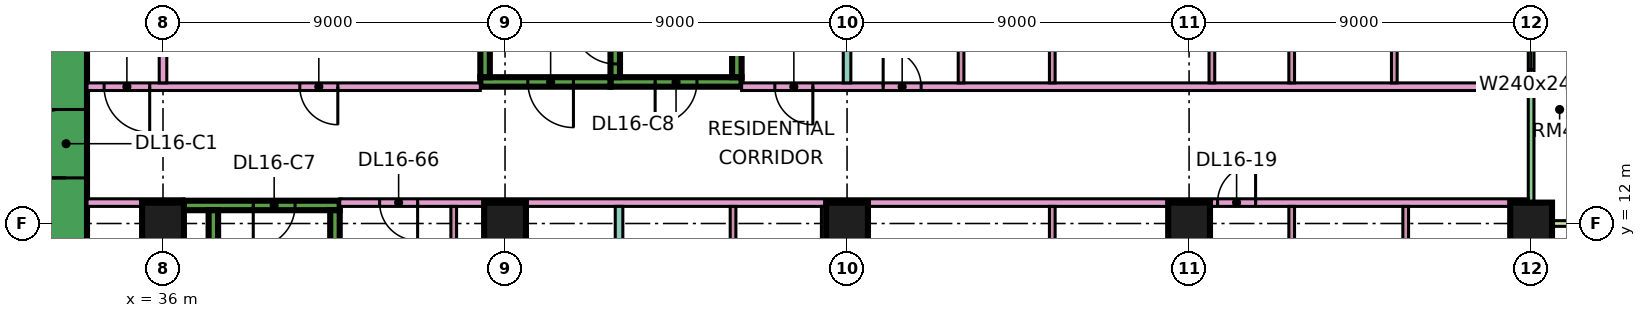
"""IFC4 building model, lengths in metres.
Left out: names, types, materials, properties, quantities, classifications, styles, units other than length and angle.
Written with IfcOpenShell. Run it as: python <this file> out.ifc"""

import sys

from ifc_helpers import new_model, si_unit, direction, frame, frame_2d, origin, origin_2d, place, context, subcontext, project, spatial, rectangle, extrude, element, fill, save


model = new_model("IFC4")
c1 = context("Model", 3, precision=1e-05, world=origin(), true_north=direction((0.0, 1.0)))
c2 = subcontext(c1, "Body", "Model", "MODEL_VIEW")
j1 = project(units=[si_unit("LENGTHUNIT", "METRE"), si_unit("PLANEANGLEUNIT", "RADIAN")], contexts=[c1])
p1 = place(None, origin())
s1 = spatial("IfcSite", under=j1, at=p1, CompositionType="ELEMENT")
p2 = place(p1, origin())
s2 = spatial("IfcBuilding", under=s1, at=p2, CompositionType="ELEMENT")
p3 = place(p2, frame((0.0, 0.0, 75.15)))
s3 = spatial("IfcBuildingStorey", under=s2, at=p3, CompositionType="ELEMENT", Elevation=75.15)
for number, where, z_axis, x_axis in (
    (1, (36.0, 12.0, 0.0), (0.0, 0.0, 1.0), (1.0, 0.0, 0.0)),
    (2, (45.0, 12.0, 0.0), (0.0, 0.0, 1.0), (1.0, 0.0, 0.0)),
    (3, (54.0, 12.0, 0.0), (0.0, 0.0, 1.0), (1.0, 0.0, 0.0)),
    (4, (63.0, 12.0, 0.0), (0.0, 0.0, 1.0), (1.0, 0.0, 0.0)),
    (5, (72.0, 12.0, 0.0), (0.0, 0.0, 1.0), (1.0, 0.0, 0.0)),
):
    element("IfcColumn", number, at=place(p3, frame(where, z_axis=z_axis, x_axis=x_axis)), inside=s3, PredefinedType="COLUMN", context=c2, shape_type="SweptSolid", body=[
        extrude(rectangle(XDim=1.1, YDim=1.1, at=origin_2d()), origin(), (0.0, 0.0, 1.0), 3.75),
    ])
p4 = place(p3, frame((33.45, 8.1, 0.0), z_axis=(0.0, 0.0, 1.0), x_axis=(0.0, 1.0, 0.0)))
e6 = element("IfcWall", 6, at=p4, inside=s3, PredefinedType="SHEAR", context=c2, shape_type="SweptSolid", body=[
    extrude(rectangle(XDim=10.8, YDim=1.1, at=frame_2d((5.4, 0.0))), origin(), (0.0, 0.0, 1.0), 3.75),
])
p5 = place(p4, frame((5.1, 0.0, 0.0)))
e7 = element("IfcOpeningElement", 7, at=p5, cuts=e6, PredefinedType="OPENING", context=c2, shape_type="SweptSolid", body=[
    extrude(rectangle(XDim=1.8, YDim=2.4, at=frame_2d((0.9, 1.2))), frame((0.0, 0.56, 0.0), z_axis=(0.0, -1.0, 0.0), x_axis=(1.0, 0.0, 0.0)), (0.0, 0.0, 1.0), 1.12),
])
p6 = place(p3, frame((36.55, 12.475, 0.0), z_axis=(0.0, 0.0, 1.0), x_axis=(1.0, 0.0, 0.0)))
e8 = element("IfcWall", 8, at=p6, inside=s3, PredefinedType="SHEAR", context=c2, shape_type="SweptSolid", body=[
    extrude(rectangle(XDim=4.1, YDim=0.25, at=frame_2d((2.05, 0.0))), origin(), (0.0, 0.0, 1.0), 3.75),
])
p7 = place(p6, frame((1.825, 0.0, 0.0)))
e9 = element("IfcOpeningElement", 9, at=p7, cuts=e8, PredefinedType="OPENING", context=c2, shape_type="SweptSolid", body=[
    extrude(rectangle(XDim=1.1, YDim=2.2, at=frame_2d((0.55, 1.1))), frame((0.0, 0.135, 0.0), z_axis=(0.0, -1.0, 0.0), x_axis=(1.0, 0.0, 0.0)), (0.0, 0.0, 1.0), 0.27),
])
for number, where, z_axis, x_axis in (
    (10, (37.325, 5.85, 0.0), (0.0, 0.0, 1.0), (0.0, 1.0, 0.0)),
    (11, (40.525, 5.85, 0.0), (0.0, 0.0, 1.0), (0.0, 1.0, 0.0)),
):
    element("IfcWall", number, at=place(p3, frame(where, z_axis=z_axis, x_axis=x_axis)), inside=s3, PredefinedType="SHEAR", context=c2, shape_type="SweptSolid", body=[
        extrude(rectangle(XDim=6.5, YDim=0.25, at=frame_2d((3.25, 0.0))), origin(), (0.0, 0.0, 1.0), 3.75),
    ])
p8 = place(p3, frame((47.775, 15.725, 0.0), z_axis=(0.0, 0.0, 1.0), x_axis=(1.0, 0.0, 0.0)))
e12 = element("IfcWall", 12, at=p8, inside=s3, PredefinedType="SHEAR", context=c2, shape_type="SweptSolid", body=[
    extrude(rectangle(XDim=3.45, YDim=0.25, at=frame_2d((1.725, 0.0))), origin(), (0.0, 0.0, 1.0), 3.75),
])
p9 = place(p8, frame((1.175, 0.0, 0.0)))
e13 = element("IfcOpeningElement", 13, at=p9, cuts=e12, PredefinedType="OPENING", context=c2, shape_type="SweptSolid", body=[
    extrude(rectangle(XDim=1.1, YDim=2.2, at=frame_2d((0.55, 1.1))), frame((0.0, 0.135, 0.0), z_axis=(0.0, -1.0, 0.0), x_axis=(1.0, 0.0, 0.0)), (0.0, 0.0, 1.0), 0.27),
])
p10 = place(p3, frame((47.9, 15.85, 0.0), z_axis=(0.0, 0.0, 1.0), x_axis=(0.0, 1.0, 0.0)))
e14 = element("IfcWall", 14, at=p10, inside=s3, PredefinedType="SHEAR", context=c2, shape_type="SweptSolid", body=[
    extrude(rectangle(XDim=6.5, YDim=0.25, at=frame_2d((3.25, 0.0))), origin(), (0.0, 0.0, 1.0), 3.75),
])
p11 = place(p10, frame((0.35, 0.0, 0.0)))
e15 = element("IfcOpeningElement", 15, at=p11, cuts=e14, PredefinedType="OPENING", context=c2, shape_type="SweptSolid", body=[
    extrude(rectangle(XDim=1.1, YDim=2.2, at=frame_2d((0.55, 1.1))), frame((0.0, 0.135, 0.0), z_axis=(0.0, -1.0, 0.0), x_axis=(1.0, 0.0, 0.0)), (0.0, 0.0, 1.0), 0.27),
])
p12 = place(p3, frame((51.1, 15.85, 0.0), z_axis=(0.0, 0.0, 1.0), x_axis=(0.0, 1.0, 0.0)))
e16 = element("IfcWall", 16, at=p12, inside=s3, PredefinedType="SHEAR", context=c2, shape_type="SweptSolid", body=[
    extrude(rectangle(XDim=6.5, YDim=0.25, at=frame_2d((3.25, 0.0))), origin(), (0.0, 0.0, 1.0), 3.75),
])
p13 = place(p3, frame((44.35, 15.725, 0.0), z_axis=(0.0, 0.0, 1.0), x_axis=(1.0, 0.0, 0.0)))
e17 = element("IfcWall", 17, at=p13, inside=s3, PredefinedType="SHEAR", context=c2, shape_type="SweptSolid", body=[
    extrude(rectangle(XDim=3.425, YDim=0.25, at=frame_2d((1.712, 0.0))), origin(), (0.0, 0.0, 1.0), 3.75),
])
p14 = place(p13, frame((1.25, 0.0, 0.0)))
e18 = element("IfcOpeningElement", 18, at=p14, cuts=e17, PredefinedType="OPENING", context=c2, shape_type="SweptSolid", body=[
    extrude(rectangle(XDim=1.2, YDim=2.2, at=frame_2d((0.6, 1.1))), frame((0.0, 0.135, 0.0), z_axis=(0.0, -1.0, 0.0), x_axis=(1.0, 0.0, 0.0)), (0.0, 0.0, 1.0), 0.27),
])
p15 = place(p3, frame((44.475, 15.85, 0.0), z_axis=(0.0, 0.0, 1.0), x_axis=(0.0, 1.0, 0.0)))
e19 = element("IfcWall", 19, at=p15, inside=s3, PredefinedType="SHEAR", context=c2, shape_type="SweptSolid", body=[
    extrude(rectangle(XDim=6.5, YDim=0.25, at=frame_2d((3.25, 0.0))), origin(), (0.0, 0.0, 1.0), 3.75),
])
p16 = place(p15, frame((1.75, 0.0, 0.0)))
e20 = element("IfcOpeningElement", 20, at=p16, cuts=e19, PredefinedType="OPENING", context=c2, shape_type="SweptSolid", body=[
    extrude(rectangle(XDim=1.1, YDim=2.2, at=frame_2d((0.55, 1.1))), frame((0.0, 0.135, 0.0), z_axis=(0.0, -1.0, 0.0), x_axis=(1.0, 0.0, 0.0)), (0.0, 0.0, 1.0), 0.27),
])
p17 = place(p15, frame((4.3, 0.0, 0.0)))
e21 = element("IfcOpeningElement", 21, at=p17, cuts=e19, PredefinedType="OPENING", context=c2, shape_type="SweptSolid", body=[
    extrude(rectangle(XDim=1.1, YDim=2.2, at=frame_2d((0.55, 1.1))), frame((0.0, 0.135, 0.0), z_axis=(0.0, -1.0, 0.0), x_axis=(1.0, 0.0, 0.0)), (0.0, 0.0, 1.0), 0.27),
])
p18 = place(p3, frame((72.0, 12.075, 0.0), z_axis=(0.0, 0.0, 1.0), x_axis=(0.0, 1.0, 0.0)))
e22 = element("IfcWall", 22, at=p18, inside=s3, PredefinedType="SOLIDWALL", context=c2, shape_type="SweptSolid", body=[
    extrude(rectangle(XDim=10.35, YDim=0.15, at=frame_2d((5.175, 0.0))), origin(), (0.0, 0.0, 1.0), 3.35),
])
p19 = place(p18, frame((3.975, 0.0, 0.45)))
e23 = element("IfcOpeningElement", 23, at=p19, cuts=e22, PredefinedType="OPENING", context=c2, shape_type="SweptSolid", body=[
    extrude(rectangle(XDim=2.4, YDim=2.4, at=frame_2d((1.2, 1.2))), frame((0.0, 0.085, 0.0), z_axis=(0.0, -1.0, 0.0), x_axis=(1.0, 0.0, 0.0)), (0.0, 0.0, 1.0), 0.17),
])
p20 = place(p18, frame((8.587, 0.0, 0.45)))
e24 = element("IfcOpeningElement", 24, at=p20, cuts=e22, PredefinedType="OPENING", context=c2, shape_type="SweptSolid", body=[
    extrude(rectangle(XDim=1.2, YDim=2.4, at=frame_2d((0.6, 1.2))), frame((0.0, 0.085, 0.0), z_axis=(0.0, -1.0, 0.0), x_axis=(1.0, 0.0, 0.0)), (0.0, 0.0, 1.0), 0.17),
])
p21 = place(p3, frame((73.5, 12.0, 0.0), z_axis=(0.0, 0.0, 1.0), x_axis=(-1.0, 0.0, 0.0)))
e25 = element("IfcWall", 25, at=p21, inside=s3, PredefinedType="SOLIDWALL", context=c2, shape_type="SweptSolid", body=[
    extrude(rectangle(XDim=1.5, YDim=0.15, at=frame_2d((0.75, 0.0))), origin(), (0.0, 0.0, 1.0), 3.35),
])
p22 = place(p3, frame((34.0, 12.55, 0.0), z_axis=(0.0, 0.0, 1.0), x_axis=(1.0, 0.0, 0.0)))
e26 = element("IfcWall", 26, at=p22, inside=s3, PredefinedType="PARTITIONING", context=c2, shape_type="SweptSolid", body=[
    extrude(rectangle(XDim=2.551, YDim=0.2, at=frame_2d((1.275, 0.0))), origin(), (0.0, 0.0, 1.0), 3.35),
])
p23 = place(p3, frame((34.0, 15.6, 0.0), z_axis=(0.0, 0.0, 1.0), x_axis=(1.0, 0.0, 0.0)))
e27 = element("IfcWall", 27, at=p23, inside=s3, PredefinedType="PARTITIONING", context=c2, shape_type="SweptSolid", body=[
    extrude(rectangle(XDim=10.35, YDim=0.2, at=frame_2d((5.175, 0.0))), origin(), (0.0, 0.0, 1.0), 3.35),
])
p24 = place(p23, frame((5.6, 0.0, 0.0)))
e28 = element("IfcOpeningElement", 28, at=p24, cuts=e27, PredefinedType="OPENING", context=c2, shape_type="SweptSolid", body=[
    extrude(rectangle(XDim=1.0, YDim=2.1, at=frame_2d((0.5, 1.05))), frame((0.0, 0.11, 0.0), z_axis=(0.0, -1.0, 0.0), x_axis=(1.0, 0.0, 0.0)), (0.0, 0.0, 1.0), 0.22),
])
p25 = place(p23, frame((0.45, 0.0, 0.0)))
e29 = element("IfcOpeningElement", 29, at=p25, cuts=e27, PredefinedType="OPENING", context=c2, shape_type="SweptSolid", body=[
    extrude(rectangle(XDim=1.2, YDim=2.1, at=frame_2d((0.6, 1.05))), frame((0.0, 0.11, 0.0), z_axis=(0.0, -1.0, 0.0), x_axis=(1.0, 0.0, 0.0)), (0.0, 0.0, 1.0), 0.22),
])
p26 = place(p3, frame((36.0, 15.7, 0.0), z_axis=(0.0, 0.0, 1.0), x_axis=(0.0, 1.0, 0.0)))
e30 = element("IfcWall", 30, at=p26, inside=s3, PredefinedType="PARTITIONING", context=c2, shape_type="SweptSolid", body=[
    extrude(rectangle(XDim=8.3, YDim=0.2, at=frame_2d((4.15, 0.0))), origin(), (0.0, 0.0, 1.0), 3.35),
])
p27 = place(p3, frame((40.65, 12.55, 0.0), z_axis=(0.0, 0.0, 1.0), x_axis=(1.0, 0.0, 0.0)))
e31 = element("IfcWall", 31, at=p27, inside=s3, PredefinedType="PARTITIONING", context=c2, shape_type="SweptSolid", body=[
    extrude(rectangle(XDim=31.276, YDim=0.2, at=frame_2d((15.638, 0.0))), origin(), (0.0, 0.0, 1.0), 3.35),
])
p28 = place(p27, frame((23.1, 0.0, 0.0)))
e32 = element("IfcOpeningElement", 32, at=p28, cuts=e31, PredefinedType="OPENING", context=c2, shape_type="SweptSolid", body=[
    extrude(rectangle(XDim=1.0, YDim=2.1, at=frame_2d((0.5, 1.05))), frame((0.0, 0.11, 0.0), z_axis=(0.0, -1.0, 0.0), x_axis=(1.0, 0.0, 0.0)), (0.0, 0.0, 1.0), 0.22),
])
p29 = place(p27, frame((1.05, 0.0, 0.0)))
e33 = element("IfcOpeningElement", 33, at=p29, cuts=e31, PredefinedType="OPENING", context=c2, shape_type="SweptSolid", body=[
    extrude(rectangle(XDim=1.0, YDim=2.1, at=frame_2d((0.5, 1.05))), frame((0.0, 0.11, 0.0), z_axis=(0.0, -1.0, 0.0), x_axis=(1.0, 0.0, 0.0)), (0.0, 0.0, 1.0), 0.22),
])
p30 = place(p3, frame((43.65, 5.825, 0.0), z_axis=(0.0, 0.0, 1.0), x_axis=(0.0, 1.0, 0.0)))
e34 = element("IfcWall", 34, at=p30, inside=s3, PredefinedType="PARTITIONING", context=c2, shape_type="SweptSolid", body=[
    extrude(rectangle(XDim=6.625, YDim=0.15, at=frame_2d((3.312, 0.0))), origin(), (0.0, 0.0, 1.0), 3.35),
])
p31 = place(p30, frame((4.425, 0.0, 0.0)))
e35 = element("IfcOpeningElement", 35, at=p31, cuts=e34, PredefinedType="OPENING", context=c2, shape_type="SweptSolid", body=[
    extrude(rectangle(XDim=0.9, YDim=2.1, at=frame_2d((0.45, 1.05))), frame((0.0, 0.085, 0.0), z_axis=(0.0, -1.0, 0.0), x_axis=(1.0, 0.0, 0.0)), (0.0, 0.0, 1.0), 0.17),
])
p32 = place(p3, frame((48.0, 5.875, 0.0), z_axis=(0.0, 0.0, 1.0), x_axis=(0.0, 1.0, 0.0)))
e36 = element("IfcWall", 36, at=p32, inside=s3, PredefinedType="PARTITIONING", context=c2, shape_type="SweptSolid", body=[
    extrude(rectangle(XDim=6.575, YDim=0.2, at=frame_2d((3.288, 0.0))), origin(), (0.0, 0.0, 1.0), 3.35),
])
p33 = place(p3, frame((51.0, 7.225, 0.0), z_axis=(0.0, 0.0, 1.0), x_axis=(0.0, 1.0, 0.0)))
e37 = element("IfcWall", 37, at=p33, inside=s3, PredefinedType="PARTITIONING", context=c2, shape_type="SweptSolid", body=[
    extrude(rectangle(XDim=5.225, YDim=0.15, at=frame_2d((2.612, 0.0))), origin(), (0.0, 0.0, 1.0), 3.35),
])
p34 = place(p3, frame((51.225, 15.6, 0.0), z_axis=(0.0, 0.0, 1.0), x_axis=(1.0, 0.0, 0.0)))
e38 = element("IfcWall", 38, at=p34, inside=s3, PredefinedType="PARTITIONING", context=c2, shape_type="SweptSolid", body=[
    extrude(rectangle(XDim=20.701, YDim=0.2, at=frame_2d((10.351, 0.0))), origin(), (0.0, 0.0, 1.0), 3.35),
])
p35 = place(p34, frame((3.725, 0.0, 0.0)))
e39 = element("IfcOpeningElement", 39, at=p35, cuts=e38, PredefinedType="OPENING", context=c2, shape_type="SweptSolid", body=[
    extrude(rectangle(XDim=1.0, YDim=2.1, at=frame_2d((0.5, 1.05))), frame((0.0, 0.11, 0.0), z_axis=(0.0, -1.0, 0.0), x_axis=(1.0, 0.0, 0.0)), (0.0, 0.0, 1.0), 0.22),
])
p36 = place(p34, frame((0.875, 0.0, 0.0)))
e40 = element("IfcOpeningElement", 40, at=p36, cuts=e38, PredefinedType="OPENING", context=c2, shape_type="SweptSolid", body=[
    extrude(rectangle(XDim=1.0, YDim=2.1, at=frame_2d((0.5, 1.05))), frame((0.0, 0.11, 0.0), z_axis=(0.0, -1.0, 0.0), x_axis=(1.0, 0.0, 0.0)), (0.0, 0.0, 1.0), 0.22),
])
p37 = place(p3, frame((53.4, 7.225, 0.0), z_axis=(0.0, 0.0, 1.0), x_axis=(0.0, 1.0, 0.0)))
e41 = element("IfcWall", 41, at=p37, inside=s3, PredefinedType="PARTITIONING", context=c2, shape_type="SweptSolid", body=[
    extrude(rectangle(XDim=5.225, YDim=0.15, at=frame_2d((2.612, 0.0))), origin(), (0.0, 0.0, 1.0), 3.35),
])
p38 = place(p3, frame((54.0, 15.7, 0.0), z_axis=(0.0, 0.0, 1.0), x_axis=(0.0, 1.0, 0.0)))
e42 = element("IfcWall", 42, at=p38, inside=s3, PredefinedType="PARTITIONING", context=c2, shape_type="SweptSolid", body=[
    extrude(rectangle(XDim=8.3, YDim=0.2, at=frame_2d((4.15, 0.0))), origin(), (0.0, 0.0, 1.0), 3.35),
])
p39 = place(p3, frame((57.0, 15.7, 0.0), z_axis=(0.0, 0.0, 1.0), x_axis=(0.0, 1.0, 0.0)))
e43 = element("IfcWall", 43, at=p39, inside=s3, PredefinedType="PARTITIONING", context=c2, shape_type="SweptSolid", body=[
    extrude(rectangle(XDim=3.125, YDim=0.15, at=frame_2d((1.562, 0.0))), origin(), (0.0, 0.0, 1.0), 3.35),
])
p40 = place(p3, frame((59.4, 7.225, 0.0), z_axis=(0.0, 0.0, 1.0), x_axis=(0.0, 1.0, 0.0)))
e44 = element("IfcWall", 44, at=p40, inside=s3, PredefinedType="PARTITIONING", context=c2, shape_type="SweptSolid", body=[
    extrude(rectangle(XDim=5.225, YDim=0.15, at=frame_2d((2.612, 0.0))), origin(), (0.0, 0.0, 1.0), 3.35),
])
p41 = place(p3, frame((59.4, 15.7, 0.0), z_axis=(0.0, 0.0, 1.0), x_axis=(0.0, 1.0, 0.0)))
e45 = element("IfcWall", 45, at=p41, inside=s3, PredefinedType="PARTITIONING", context=c2, shape_type="SweptSolid", body=[
    extrude(rectangle(XDim=3.125, YDim=0.15, at=frame_2d((1.562, 0.0))), origin(), (0.0, 0.0, 1.0), 3.35),
])
p42 = place(p3, frame((62.7, 7.225, 0.0), z_axis=(0.0, 0.0, 1.0), x_axis=(0.0, 1.0, 0.0)))
e46 = element("IfcWall", 46, at=p42, inside=s3, PredefinedType="PARTITIONING", context=c2, shape_type="SweptSolid", body=[
    extrude(rectangle(XDim=5.225, YDim=0.15, at=frame_2d((2.612, 0.0))), origin(), (0.0, 0.0, 1.0), 3.35),
])
p43 = place(p42, frame((2.275, 0.0, 0.0)))
e47 = element("IfcOpeningElement", 47, at=p43, cuts=e46, PredefinedType="OPENING", context=c2, shape_type="SweptSolid", body=[
    extrude(rectangle(XDim=0.8, YDim=2.1, at=frame_2d((0.4, 1.05))), frame((0.0, 0.085, 0.0), z_axis=(0.0, -1.0, 0.0), x_axis=(1.0, 0.0, 0.0)), (0.0, 0.0, 1.0), 0.17),
])
p44 = place(p3, frame((63.6, 15.7, 0.0), z_axis=(0.0, 0.0, 1.0), x_axis=(0.0, 1.0, 0.0)))
e48 = element("IfcWall", 48, at=p44, inside=s3, PredefinedType="PARTITIONING", context=c2, shape_type="SweptSolid", body=[
    extrude(rectangle(XDim=3.125, YDim=0.15, at=frame_2d((1.562, 0.0))), origin(), (0.0, 0.0, 1.0), 3.35),
])
p45 = place(p3, frame((65.7, 7.225, 0.0), z_axis=(0.0, 0.0, 1.0), x_axis=(0.0, 1.0, 0.0)))
e49 = element("IfcWall", 49, at=p45, inside=s3, PredefinedType="PARTITIONING", context=c2, shape_type="SweptSolid", body=[
    extrude(rectangle(XDim=5.225, YDim=0.15, at=frame_2d((2.612, 0.0))), origin(), (0.0, 0.0, 1.0), 3.35),
])
for number, where, z_axis, x_axis in (
    (50, (65.7, 15.7, 0.0), (0.0, 0.0, 1.0), (0.0, 1.0, 0.0)),
    (51, (68.4, 15.7, 0.0), (0.0, 0.0, 1.0), (0.0, 1.0, 0.0)),
):
    element("IfcWall", number, at=place(p3, frame(where, z_axis=z_axis, x_axis=x_axis)), inside=s3, PredefinedType="PARTITIONING", context=c2, shape_type="SweptSolid", body=[
        extrude(rectangle(XDim=3.125, YDim=0.15, at=frame_2d((1.562, 0.0))), origin(), (0.0, 0.0, 1.0), 3.35),
    ])
p46 = place(p3, frame((68.7, 7.225, 0.0), z_axis=(0.0, 0.0, 1.0), x_axis=(0.0, 1.0, 0.0)))
e52 = element("IfcWall", 52, at=p46, inside=s3, PredefinedType="PARTITIONING", context=c2, shape_type="SweptSolid", body=[
    extrude(rectangle(XDim=5.225, YDim=0.15, at=frame_2d((2.612, 0.0))), origin(), (0.0, 0.0, 1.0), 3.35),
])
p47 = place(p19, origin())
e53 = element("IfcWindow", 53, at=p47, inside=s3, PartitioningType="SINGLE_PANEL", PredefinedType="WINDOW", context=c2, shape_type="SweptSolid", body=[
    extrude(rectangle(XDim=2.4, YDim=2.4, at=frame_2d((1.2, 1.2))), frame((0.0, 0.03, 0.0), z_axis=(0.0, -1.0, 0.0), x_axis=(1.0, 0.0, 0.0)), (0.0, 0.0, 1.0), 0.06),
])
fill(e23, e53)
p48 = place(p5, origin())
e54 = element("IfcDoor", 54, at=p48, inside=s3, OperationType="DOUBLE_DOOR_SINGLE_SWING", PredefinedType="DOOR", context=c2, shape_type="SweptSolid", body=[
    extrude(rectangle(XDim=1.8, YDim=2.4, at=frame_2d((0.9, 1.2))), frame((0.0, 0.025, 0.0), z_axis=(0.0, -1.0, 0.0), x_axis=(1.0, 0.0, 0.0)), (0.0, 0.0, 1.0), 0.05),
])
fill(e7, e54)
p49 = place(p7, frame((1.1, 0.0, 0.0), z_axis=(0.0, 0.0, 1.0), x_axis=(-1.0, 0.0, 0.0)))
e55 = element("IfcDoor", 55, at=p49, inside=s3, OperationType="SINGLE_SWING_LEFT", PredefinedType="DOOR", context=c2, shape_type="SweptSolid", body=[
    extrude(rectangle(XDim=1.1, YDim=2.2, at=frame_2d((0.55, 1.1))), frame((0.0, 0.025, 0.0), z_axis=(0.0, -1.0, 0.0), x_axis=(1.0, 0.0, 0.0)), (0.0, 0.0, 1.0), 0.05),
])
fill(e9, e55)
p50 = place(p9, frame((1.1, 0.0, 0.0), z_axis=(0.0, 0.0, 1.0), x_axis=(-1.0, 0.0, 0.0)))
e56 = element("IfcDoor", 56, at=p50, inside=s3, OperationType="SINGLE_SWING_LEFT", PredefinedType="DOOR", context=c2, shape_type="SweptSolid", body=[
    extrude(rectangle(XDim=1.1, YDim=2.2, at=frame_2d((0.55, 1.1))), frame((0.0, 0.025, 0.0), z_axis=(0.0, -1.0, 0.0), x_axis=(1.0, 0.0, 0.0)), (0.0, 0.0, 1.0), 0.05),
])
fill(e13, e56)
p51 = place(p14, origin())
e57 = element("IfcDoor", 57, at=p51, inside=s3, OperationType="SINGLE_SWING_RIGHT", PredefinedType="DOOR", context=c2, shape_type="SweptSolid", body=[
    extrude(rectangle(XDim=1.2, YDim=2.2, at=frame_2d((0.6, 1.1))), frame((0.0, 0.025, 0.0), z_axis=(0.0, -1.0, 0.0), x_axis=(1.0, 0.0, 0.0)), (0.0, 0.0, 1.0), 0.05),
])
fill(e18, e57)
p52 = place(p11, frame((1.1, 0.0, 0.0), z_axis=(0.0, 0.0, 1.0), x_axis=(-1.0, 0.0, 0.0)))
e58 = element("IfcDoor", 58, at=p52, inside=s3, OperationType="SINGLE_SWING_RIGHT", PredefinedType="DOOR", context=c2, shape_type="SweptSolid", body=[
    extrude(rectangle(XDim=1.1, YDim=2.2, at=frame_2d((0.55, 1.1))), frame((0.0, 0.025, 0.0), z_axis=(0.0, -1.0, 0.0), x_axis=(1.0, 0.0, 0.0)), (0.0, 0.0, 1.0), 0.05),
])
fill(e15, e58)
p53 = place(p24, origin())
e59 = element("IfcDoor", 59, at=p53, inside=s3, OperationType="SINGLE_SWING_RIGHT", PredefinedType="DOOR", context=c2, shape_type="SweptSolid", body=[
    extrude(rectangle(XDim=1.0, YDim=2.1, at=frame_2d((0.5, 1.05))), frame((0.0, 0.025, 0.0), z_axis=(0.0, -1.0, 0.0), x_axis=(1.0, 0.0, 0.0)), (0.0, 0.0, 1.0), 0.05),
])
fill(e28, e59)
p54 = place(p35, origin())
e60 = element("IfcDoor", 60, at=p54, inside=s3, OperationType="SINGLE_SWING_LEFT", PredefinedType="DOOR", context=c2, shape_type="SweptSolid", body=[
    extrude(rectangle(XDim=1.0, YDim=2.1, at=frame_2d((0.5, 1.05))), frame((0.0, 0.025, 0.0), z_axis=(0.0, -1.0, 0.0), x_axis=(1.0, 0.0, 0.0)), (0.0, 0.0, 1.0), 0.05),
])
fill(e39, e60)
p55 = place(p28, frame((1.0, 0.0, 0.0), z_axis=(0.0, 0.0, 1.0), x_axis=(-1.0, 0.0, 0.0)))
e61 = element("IfcDoor", 61, at=p55, inside=s3, OperationType="SINGLE_SWING_RIGHT", PredefinedType="DOOR", context=c2, shape_type="SweptSolid", body=[
    extrude(rectangle(XDim=1.0, YDim=2.1, at=frame_2d((0.5, 1.05))), frame((0.0, 0.025, 0.0), z_axis=(0.0, -1.0, 0.0), x_axis=(1.0, 0.0, 0.0)), (0.0, 0.0, 1.0), 0.05),
])
fill(e32, e61)
p56 = place(p25, origin())
e62 = element("IfcDoor", 62, at=p56, inside=s3, OperationType="SINGLE_SWING_RIGHT", PredefinedType="DOOR", context=c2, shape_type="SweptSolid", body=[
    extrude(rectangle(XDim=1.2, YDim=2.1, at=frame_2d((0.6, 1.05))), frame((0.0, 0.025, 0.0), z_axis=(0.0, -1.0, 0.0), x_axis=(1.0, 0.0, 0.0)), (0.0, 0.0, 1.0), 0.05),
])
fill(e29, e62)
p57 = place(p36, origin())
e63 = element("IfcDoor", 63, at=p57, inside=s3, OperationType="SINGLE_SWING_RIGHT", PredefinedType="DOOR", context=c2, shape_type="SweptSolid", body=[
    extrude(rectangle(XDim=1.0, YDim=2.1, at=frame_2d((0.5, 1.05))), frame((0.0, 0.025, 0.0), z_axis=(0.0, -1.0, 0.0), x_axis=(1.0, 0.0, 0.0)), (0.0, 0.0, 1.0), 0.05),
])
fill(e40, e63)
p58 = place(p29, origin())
e64 = element("IfcDoor", 64, at=p58, inside=s3, OperationType="SINGLE_SWING_RIGHT", PredefinedType="DOOR", context=c2, shape_type="SweptSolid", body=[
    extrude(rectangle(XDim=1.0, YDim=2.1, at=frame_2d((0.5, 1.05))), frame((0.0, 0.025, 0.0), z_axis=(0.0, -1.0, 0.0), x_axis=(1.0, 0.0, 0.0)), (0.0, 0.0, 1.0), 0.05),
])
fill(e33, e64)
save(model, sys.argv[1])
